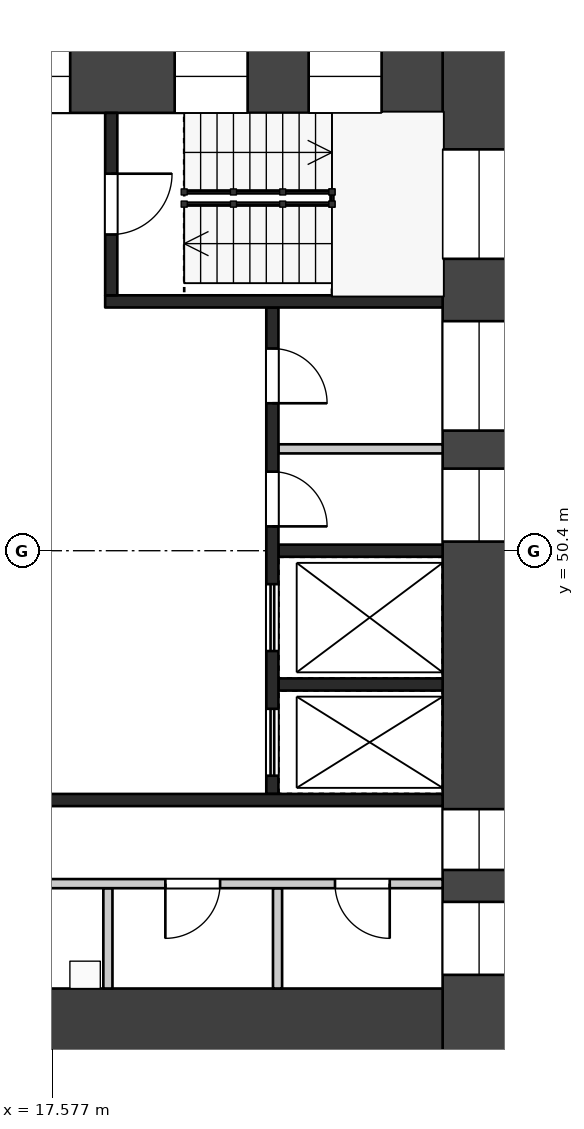
"""IFC4 building model, lengths in metres.
Left out: names, types, materials, properties, quantities, classifications, styles, units other than length and angle.
Written with IfcOpenShell. Run it as: python <this file> out.ifc"""

import sys

from ifc_helpers import new_model, si_unit, direction, frame, frame_2d, origin, place, context, subcontext, project, spatial, rectangle, extrude, element, fill, save


model = new_model("IFC4")
c1 = context("Model", 3, precision=1e-05, world=origin(), true_north=direction((0.0, 1.0)))
c2 = subcontext(c1, "Body", "Model", "MODEL_VIEW")
j1 = project(units=[si_unit("LENGTHUNIT", "METRE"), si_unit("PLANEANGLEUNIT", "RADIAN")], contexts=[c1])
p1 = place(None, origin())
s1 = spatial("IfcSite", under=j1, at=p1, CompositionType="ELEMENT")
p2 = place(p1, origin())
s2 = spatial("IfcBuilding", under=s1, at=p2, CompositionType="ELEMENT")
p3 = place(p2, frame((0.0, 0.0, 147.7)))
s3 = spatial("IfcBuildingStorey", under=s2, at=p3, CompositionType="ELEMENT", Elevation=147.7)
p4 = place(p3, frame((24.6, 58.8, 0.0), z_axis=(0.0, 0.0, 1.0), x_axis=(0.0, -1.0, 0.0)))
e1 = element("IfcWall", 1, at=p4, inside=s3, PredefinedType="SHEAR", context=c2, shape_type="SweptSolid", body=[
    extrude(rectangle(XDim=16.8, YDim=1.2, at=frame_2d((8.4, 0.0))), origin(), (0.0, 0.0, 1.0), 3.22),
])
p5 = place(p4, frame((1.8, 0.0, 0.5)))
e2 = element("IfcOpeningElement", 2, at=p5, cuts=e1, PredefinedType="OPENING", context=c2, shape_type="SweptSolid", body=[
    extrude(rectangle(XDim=1.8, YDim=2.4, at=frame_2d((0.9, 1.2))), frame((0.0, 0.61, 0.0), z_axis=(0.0, -1.0, 0.0), x_axis=(1.0, 0.0, 0.0)), (0.0, 0.0, 1.0), 1.22),
])
p6 = place(p4, frame((4.625, 0.0, 1.6)))
e3 = element("IfcOpeningElement", 3, at=p6, cuts=e1, PredefinedType="OPENING", context=c2, shape_type="SweptSolid", body=[
    extrude(rectangle(XDim=1.8, YDim=1.2, at=frame_2d((0.9, 0.6))), frame((0.0, 0.61, 0.0), z_axis=(0.0, -1.0, 0.0), x_axis=(1.0, 0.0, 0.0)), (0.0, 0.0, 1.0), 1.22),
])
p7 = place(p4, frame((7.05, 0.0, 1.6)))
e4 = element("IfcOpeningElement", 4, at=p7, cuts=e1, PredefinedType="OPENING", context=c2, shape_type="SweptSolid", body=[
    extrude(rectangle(XDim=1.2, YDim=1.2, at=frame_2d((0.6, 0.6))), frame((0.0, 0.61, 0.0), z_axis=(0.0, -1.0, 0.0), x_axis=(1.0, 0.0, 0.0)), (0.0, 0.0, 1.0), 1.22),
])
p8 = place(p4, frame((12.65, 0.0, 0.6)))
e5 = element("IfcOpeningElement", 5, at=p8, cuts=e1, PredefinedType="OPENING", context=c2, shape_type="SweptSolid", body=[
    extrude(rectangle(XDim=1.0, YDim=2.1, at=frame_2d((0.5, 1.05))), frame((0.0, 0.61, 0.0), z_axis=(0.0, -1.0, 0.0), x_axis=(1.0, 0.0, 0.0)), (0.0, 0.0, 1.0), 1.22),
])
p9 = place(p4, frame((14.175, 0.0, 1.6)))
e6 = element("IfcOpeningElement", 6, at=p9, cuts=e1, PredefinedType="OPENING", context=c2, shape_type="SweptSolid", body=[
    extrude(rectangle(XDim=1.2, YDim=1.2, at=frame_2d((0.6, 0.6))), frame((0.0, 0.61, 0.0), z_axis=(0.0, -1.0, 0.0), x_axis=(1.0, 0.0, 0.0)), (0.0, 0.0, 1.0), 1.22),
])
p10 = place(p3, frame((9.6, 58.2, 0.0), z_axis=(0.0, 0.0, 1.0), x_axis=(1.0, 0.0, 0.0)))
e7 = element("IfcWall", 7, at=p10, inside=s3, PredefinedType="SHEAR", context=c2, shape_type="SweptSolid", body=[
    extrude(rectangle(XDim=14.4, YDim=1.2, at=frame_2d((7.2, 0.0))), origin(), (0.0, 0.0, 1.0), 3.22),
])
p11 = place(p10, frame((1.105, 0.0, 0.6)))
e8 = element("IfcOpeningElement", 8, at=p11, cuts=e7, PredefinedType="OPENING", context=c2, shape_type="SweptSolid", body=[
    extrude(rectangle(XDim=3.0, YDim=2.1, at=frame_2d((1.5, 1.05))), frame((0.0, 0.61, 0.0), z_axis=(0.0, -1.0, 0.0), x_axis=(1.0, 0.0, 0.0)), (0.0, 0.0, 1.0), 1.22),
])
p12 = place(p10, frame((5.875, 0.0, 0.6)))
e9 = element("IfcOpeningElement", 9, at=p12, cuts=e7, PredefinedType="OPENING", context=c2, shape_type="SweptSolid", body=[
    extrude(rectangle(XDim=2.4, YDim=2.1, at=frame_2d((1.2, 1.05))), frame((0.0, 0.61, 0.0), z_axis=(0.0, -1.0, 0.0), x_axis=(1.0, 0.0, 0.0)), (0.0, 0.0, 1.0), 1.22),
])
p13 = place(p10, frame((9.993, 0.0, 0.5)))
e10 = element("IfcOpeningElement", 10, at=p13, cuts=e7, PredefinedType="OPENING", context=c2, shape_type="SweptSolid", body=[
    extrude(rectangle(XDim=1.2, YDim=2.4, at=frame_2d((0.6, 1.2))), frame((0.0, 0.61, 0.0), z_axis=(0.0, -1.0, 0.0), x_axis=(1.0, 0.0, 0.0)), (0.0, 0.0, 1.0), 1.22),
])
p14 = place(p10, frame((12.197, 0.0, 0.5)))
e11 = element("IfcOpeningElement", 11, at=p14, cuts=e7, PredefinedType="OPENING", context=c2, shape_type="SweptSolid", body=[
    extrude(rectangle(XDim=1.2, YDim=2.4, at=frame_2d((0.6, 1.2))), frame((0.0, 0.61, 0.0), z_axis=(0.0, -1.0, 0.0), x_axis=(1.0, 0.0, 0.0)), (0.0, 0.0, 1.0), 1.22),
])
p15 = place(p3, frame((9.6, 42.6, 0.0), z_axis=(0.0, 0.0, 1.0), x_axis=(1.0, 0.0, 0.0)))
e12 = element("IfcWall", 12, at=p15, inside=s3, PredefinedType="SHEAR", context=c2, shape_type="SweptSolid", body=[
    extrude(rectangle(XDim=14.4, YDim=1.2, at=frame_2d((7.2, 0.0))), origin(), (0.0, 0.0, 1.0), 3.22),
])
p16 = place(p15, frame((2.1, 0.0, 0.0)))
e13 = element("IfcOpeningElement", 13, at=p16, cuts=e12, PredefinedType="OPENING", context=c2, shape_type="SweptSolid", body=[
    extrude(rectangle(XDim=1.8, YDim=2.1, at=frame_2d((0.9, 1.05))), frame((0.0, 0.61, 0.0), z_axis=(0.0, -1.0, 0.0), x_axis=(1.0, 0.0, 0.0)), (0.0, 0.0, 1.0), 1.22),
])
for number, where, z_axis, x_axis in (
    (14, (21.3, 50.4, 0.0), (0.0, 0.0, 1.0), (1.0, 0.0, 0.0)),
    (15, (21.3, 48.2, 0.0), (0.0, 0.0, 1.0), (1.0, 0.0, 0.0)),
):
    element("IfcWall", number, at=place(p3, frame(where, z_axis=z_axis, x_axis=x_axis)), inside=s3, PredefinedType="SHEAR", context=c2, shape_type="SweptSolid", body=[
        extrude(rectangle(XDim=2.7, YDim=0.2, at=frame_2d((1.35, 0.0))), origin(), (0.0, 0.0, 1.0), 3.22),
    ])
p17 = place(p3, frame((21.3, 52.075, 0.0), z_axis=(0.0, 0.0, 1.0), x_axis=(1.0, 0.0, 0.0)))
e16 = element("IfcWall", 16, at=p17, inside=s3, PredefinedType="PARTITIONING", context=c2, shape_type="SweptSolid", body=[
    extrude(rectangle(XDim=2.7, YDim=0.15, at=frame_2d((1.35, 0.0))), origin(), (0.0, 0.0, 1.0), 3.22),
])
p18 = place(p3, frame((21.2, 54.4, 0.0), z_axis=(0.0, 0.0, 1.0), x_axis=(0.0, -1.0, 0.0)))
e17 = element("IfcWall", 17, at=p18, inside=s3, PredefinedType="SHEAR", context=c2, shape_type="SweptSolid", body=[
    extrude(rectangle(XDim=8.0, YDim=0.2, at=frame_2d((4.0, 0.0))), origin(), (0.0, 0.0, 1.0), 3.22),
])
p19 = place(p18, frame((0.675, 0.0, 0.0)))
e18 = element("IfcOpeningElement", 18, at=p19, cuts=e17, PredefinedType="OPENING", context=c2, shape_type="SweptSolid", body=[
    extrude(rectangle(XDim=0.9, YDim=2.1, at=frame_2d((0.45, 1.05))), frame((0.0, 0.11, 0.0), z_axis=(0.0, -1.0, 0.0), x_axis=(1.0, 0.0, 0.0)), (0.0, 0.0, 1.0), 0.22),
])
p20 = place(p18, frame((2.7, 0.0, 0.0)))
e19 = element("IfcOpeningElement", 19, at=p20, cuts=e17, PredefinedType="OPENING", context=c2, shape_type="SweptSolid", body=[
    extrude(rectangle(XDim=0.9, YDim=2.1, at=frame_2d((0.45, 1.05))), frame((0.0, 0.11, 0.0), z_axis=(0.0, -1.0, 0.0), x_axis=(1.0, 0.0, 0.0)), (0.0, 0.0, 1.0), 0.22),
])
p21 = place(p18, frame((4.55, 0.0, 0.0)))
e20 = element("IfcOpeningElement", 20, at=p21, cuts=e17, PredefinedType="OPENING", context=c2, shape_type="SweptSolid", body=[
    extrude(rectangle(XDim=1.1, YDim=2.1, at=frame_2d((0.55, 1.05))), frame((0.0, 0.11, 0.0), z_axis=(0.0, -1.0, 0.0), x_axis=(1.0, 0.0, 0.0)), (0.0, 0.0, 1.0), 0.22),
])
p22 = place(p18, frame((6.6, 0.0, 0.0)))
e21 = element("IfcOpeningElement", 21, at=p22, cuts=e17, PredefinedType="OPENING", context=c2, shape_type="SweptSolid", body=[
    extrude(rectangle(XDim=1.1, YDim=2.1, at=frame_2d((0.55, 1.05))), frame((0.0, 0.11, 0.0), z_axis=(0.0, -1.0, 0.0), x_axis=(1.0, 0.0, 0.0)), (0.0, 0.0, 1.0), 0.22),
])
p23 = place(p3, frame((18.45, 54.5, 0.0), z_axis=(0.0, 0.0, 1.0), x_axis=(1.0, 0.0, 0.0)))
e22 = element("IfcWall", 22, at=p23, inside=s3, PredefinedType="SHEAR", context=c2, shape_type="SweptSolid", body=[
    extrude(rectangle(XDim=5.55, YDim=0.2, at=frame_2d((2.775, 0.0))), origin(), (0.0, 0.0, 1.0), 3.22),
])
p24 = place(p3, frame((18.55, 57.6, 0.0), z_axis=(0.0, 0.0, 1.0), x_axis=(0.0, -1.0, 0.0)))
e23 = element("IfcWall", 23, at=p24, inside=s3, PredefinedType="SHEAR", context=c2, shape_type="SweptSolid", body=[
    extrude(rectangle(XDim=3.0, YDim=0.2, at=frame_2d((1.5, 0.0))), origin(), (0.0, 0.0, 1.0), 3.22),
])
p25 = place(p24, frame((1.0, 0.0, 0.0)))
e24 = element("IfcOpeningElement", 24, at=p25, cuts=e23, PredefinedType="OPENING", context=c2, shape_type="SweptSolid", body=[
    extrude(rectangle(XDim=1.0, YDim=2.1, at=frame_2d((0.5, 1.05))), frame((0.0, 0.11, 0.0), z_axis=(0.0, -1.0, 0.0), x_axis=(1.0, 0.0, 0.0)), (0.0, 0.0, 1.0), 0.22),
])
p26 = place(p3, frame((14.75, 46.3, 0.0), z_axis=(0.0, 0.0, 1.0), x_axis=(1.0, 0.0, 0.0)))
e25 = element("IfcWall", 25, at=p26, inside=s3, PredefinedType="SHEAR", context=c2, shape_type="SweptSolid", body=[
    extrude(rectangle(XDim=9.25, YDim=0.2, at=frame_2d((4.625, 0.0))), origin(), (0.0, 0.0, 1.0), 3.22),
])
for number, where, z_axis, x_axis in (
    (26, (18.495, 44.85, 0.0), (0.0, 0.0, 1.0), (0.0, -1.0, 0.0)),
    (27, (21.285, 44.85, 0.0), (0.0, 0.0, 1.0), (0.0, -1.0, 0.0)),
):
    element("IfcWall", number, at=place(p3, frame(where, z_axis=z_axis, x_axis=x_axis)), inside=s3, PredefinedType="PARTITIONING", context=c2, shape_type="SweptSolid", body=[
        extrude(rectangle(XDim=1.65, YDim=0.15, at=frame_2d((0.825, 0.0))), origin(), (0.0, 0.0, 1.0), 3.22),
    ])
p27 = place(p3, frame((14.9, 44.925, 0.0), z_axis=(0.0, 0.0, 1.0), x_axis=(1.0, 0.0, 0.0)))
e28 = element("IfcWall", 28, at=p27, inside=s3, PredefinedType="PARTITIONING", context=c2, shape_type="SweptSolid", body=[
    extrude(rectangle(XDim=9.1, YDim=0.15, at=frame_2d((4.55, 0.0))), origin(), (0.0, 0.0, 1.0), 3.22),
])
p28 = place(p27, frame((1.26, 0.0, 0.0)))
e29 = element("IfcOpeningElement", 29, at=p28, cuts=e28, PredefinedType="OPENING", context=c2, shape_type="SweptSolid", body=[
    extrude(rectangle(XDim=1.0, YDim=2.1, at=frame_2d((0.5, 1.05))), frame((0.0, 0.085, 0.0), z_axis=(0.0, -1.0, 0.0), x_axis=(1.0, 0.0, 0.0)), (0.0, 0.0, 1.0), 0.17),
])
p29 = place(p27, frame((4.54, 0.0, 0.0)))
e30 = element("IfcOpeningElement", 30, at=p29, cuts=e28, PredefinedType="OPENING", context=c2, shape_type="SweptSolid", body=[
    extrude(rectangle(XDim=0.9, YDim=2.1, at=frame_2d((0.45, 1.05))), frame((0.0, 0.085, 0.0), z_axis=(0.0, -1.0, 0.0), x_axis=(1.0, 0.0, 0.0)), (0.0, 0.0, 1.0), 0.17),
])
p30 = place(p27, frame((7.33, 0.0, 0.0)))
e31 = element("IfcOpeningElement", 31, at=p30, cuts=e28, PredefinedType="OPENING", context=c2, shape_type="SweptSolid", body=[
    extrude(rectangle(XDim=0.9, YDim=2.1, at=frame_2d((0.45, 1.05))), frame((0.0, 0.085, 0.0), z_axis=(0.0, -1.0, 0.0), x_axis=(1.0, 0.0, 0.0)), (0.0, 0.0, 1.0), 0.17),
])
p31 = place(p19, origin())
e32 = element("IfcDoor", 32, at=p31, inside=s3, OperationType="SINGLE_SWING_RIGHT", PredefinedType="DOOR", context=c2, shape_type="SweptSolid", body=[
    extrude(rectangle(XDim=0.9, YDim=2.1, at=frame_2d((0.45, 1.05))), frame((0.0, 0.025, 0.0), z_axis=(0.0, -1.0, 0.0), x_axis=(1.0, 0.0, 0.0)), (0.0, 0.0, 1.0), 0.05),
])
fill(e18, e32)
p32 = place(p20, origin())
e33 = element("IfcDoor", 33, at=p32, inside=s3, OperationType="SINGLE_SWING_RIGHT", PredefinedType="DOOR", context=c2, shape_type="SweptSolid", body=[
    extrude(rectangle(XDim=0.9, YDim=2.1, at=frame_2d((0.45, 1.05))), frame((0.0, 0.025, 0.0), z_axis=(0.0, -1.0, 0.0), x_axis=(1.0, 0.0, 0.0)), (0.0, 0.0, 1.0), 0.05),
])
fill(e19, e33)
p33 = place(p21, origin())
e34 = element("IfcDoor", 34, at=p33, inside=s3, OperationType="DOUBLE_DOOR_SLIDING", PredefinedType="DOOR", context=c2, shape_type="SweptSolid", body=[
    extrude(rectangle(XDim=1.1, YDim=2.1, at=frame_2d((0.55, 1.05))), frame((0.0, 0.025, 0.0), z_axis=(0.0, -1.0, 0.0), x_axis=(1.0, 0.0, 0.0)), (0.0, 0.0, 1.0), 0.05),
])
fill(e20, e34)
p34 = place(p22, origin())
e35 = element("IfcDoor", 35, at=p34, inside=s3, OperationType="DOUBLE_DOOR_SLIDING", PredefinedType="DOOR", context=c2, shape_type="SweptSolid", body=[
    extrude(rectangle(XDim=1.1, YDim=2.1, at=frame_2d((0.55, 1.05))), frame((0.0, 0.025, 0.0), z_axis=(0.0, -1.0, 0.0), x_axis=(1.0, 0.0, 0.0)), (0.0, 0.0, 1.0), 0.05),
])
fill(e21, e35)
p35 = place(p25, origin())
e36 = element("IfcDoor", 36, at=p35, inside=s3, OperationType="SINGLE_SWING_LEFT", PredefinedType="DOOR", context=c2, shape_type="SweptSolid", body=[
    extrude(rectangle(XDim=1.0, YDim=2.1, at=frame_2d((0.5, 1.05))), frame((0.0, 0.025, 0.0), z_axis=(0.0, -1.0, 0.0), x_axis=(1.0, 0.0, 0.0)), (0.0, 0.0, 1.0), 0.05),
])
fill(e24, e36)
p36 = place(p29, frame((0.9, 0.0, 0.0), z_axis=(0.0, 0.0, 1.0), x_axis=(-1.0, 0.0, 0.0)))
e37 = element("IfcDoor", 37, at=p36, inside=s3, OperationType="SINGLE_SWING_RIGHT", PredefinedType="DOOR", context=c2, shape_type="SweptSolid", body=[
    extrude(rectangle(XDim=0.9, YDim=2.1, at=frame_2d((0.45, 1.05))), frame((0.0, 0.025, 0.0), z_axis=(0.0, -1.0, 0.0), x_axis=(1.0, 0.0, 0.0)), (0.0, 0.0, 1.0), 0.05),
])
fill(e30, e37)
p37 = place(p30, frame((0.9, 0.0, 0.0), z_axis=(0.0, 0.0, 1.0), x_axis=(-1.0, 0.0, 0.0)))
e38 = element("IfcDoor", 38, at=p37, inside=s3, OperationType="SINGLE_SWING_LEFT", PredefinedType="DOOR", context=c2, shape_type="SweptSolid", body=[
    extrude(rectangle(XDim=0.9, YDim=2.1, at=frame_2d((0.45, 1.05))), frame((0.0, 0.025, 0.0), z_axis=(0.0, -1.0, 0.0), x_axis=(1.0, 0.0, 0.0)), (0.0, 0.0, 1.0), 0.05),
])
fill(e31, e38)
p38 = place(p5, origin())
e39 = element("IfcWindow", 39, at=p38, inside=s3, PartitioningType="SINGLE_PANEL", PredefinedType="WINDOW", context=c2, shape_type="SweptSolid", body=[
    extrude(rectangle(XDim=1.8, YDim=2.4, at=frame_2d((0.9, 1.2))), frame((0.0, 0.03, 0.0), z_axis=(0.0, -1.0, 0.0), x_axis=(1.0, 0.0, 0.0)), (0.0, 0.0, 1.0), 0.06),
])
fill(e2, e39)
p39 = place(p6, origin())
e40 = element("IfcWindow", 40, at=p39, inside=s3, PartitioningType="SINGLE_PANEL", PredefinedType="WINDOW", context=c2, shape_type="SweptSolid", body=[
    extrude(rectangle(XDim=1.8, YDim=1.2, at=frame_2d((0.9, 0.6))), frame((0.0, 0.03, 0.0), z_axis=(0.0, -1.0, 0.0), x_axis=(1.0, 0.0, 0.0)), (0.0, 0.0, 1.0), 0.06),
])
fill(e3, e40)
p40 = place(p7, origin())
e41 = element("IfcWindow", 41, at=p40, inside=s3, PartitioningType="SINGLE_PANEL", PredefinedType="WINDOW", context=c2, shape_type="SweptSolid", body=[
    extrude(rectangle(XDim=1.2, YDim=1.2, at=frame_2d((0.6, 0.6))), frame((0.0, 0.03, 0.0), z_axis=(0.0, -1.0, 0.0), x_axis=(1.0, 0.0, 0.0)), (0.0, 0.0, 1.0), 0.06),
])
fill(e4, e41)
p41 = place(p8, origin())
e42 = element("IfcWindow", 42, at=p41, inside=s3, PartitioningType="SINGLE_PANEL", PredefinedType="WINDOW", context=c2, shape_type="SweptSolid", body=[
    extrude(rectangle(XDim=1.0, YDim=2.1, at=frame_2d((0.5, 1.05))), frame((0.0, 0.03, 0.0), z_axis=(0.0, -1.0, 0.0), x_axis=(1.0, 0.0, 0.0)), (0.0, 0.0, 1.0), 0.06),
])
fill(e5, e42)
p42 = place(p9, origin())
e43 = element("IfcWindow", 43, at=p42, inside=s3, PartitioningType="SINGLE_PANEL", PredefinedType="WINDOW", context=c2, shape_type="SweptSolid", body=[
    extrude(rectangle(XDim=1.2, YDim=1.2, at=frame_2d((0.6, 0.6))), frame((0.0, 0.03, 0.0), z_axis=(0.0, -1.0, 0.0), x_axis=(1.0, 0.0, 0.0)), (0.0, 0.0, 1.0), 0.06),
])
fill(e6, e43)
p43 = place(p12, origin())
e44 = element("IfcWindow", 44, at=p43, inside=s3, PartitioningType="SINGLE_PANEL", PredefinedType="WINDOW", context=c2, shape_type="SweptSolid", body=[
    extrude(rectangle(XDim=2.4, YDim=2.1, at=frame_2d((1.2, 1.05))), frame((0.0, 0.03, 0.0), z_axis=(0.0, -1.0, 0.0), x_axis=(1.0, 0.0, 0.0)), (0.0, 0.0, 1.0), 0.06),
])
fill(e9, e44)
p44 = place(p13, origin())
e45 = element("IfcWindow", 45, at=p44, inside=s3, PartitioningType="SINGLE_PANEL", PredefinedType="WINDOW", context=c2, shape_type="SweptSolid", body=[
    extrude(rectangle(XDim=1.2, YDim=2.4, at=frame_2d((0.6, 1.2))), frame((0.0, 0.03, 0.0), z_axis=(0.0, -1.0, 0.0), x_axis=(1.0, 0.0, 0.0)), (0.0, 0.0, 1.0), 0.06),
])
fill(e10, e45)
p45 = place(p14, origin())
e46 = element("IfcWindow", 46, at=p45, inside=s3, PartitioningType="SINGLE_PANEL", PredefinedType="WINDOW", context=c2, shape_type="SweptSolid", body=[
    extrude(rectangle(XDim=1.2, YDim=2.4, at=frame_2d((0.6, 1.2))), frame((0.0, 0.03, 0.0), z_axis=(0.0, -1.0, 0.0), x_axis=(1.0, 0.0, 0.0)), (0.0, 0.0, 1.0), 0.06),
])
fill(e11, e46)
save(model, sys.argv[1])
